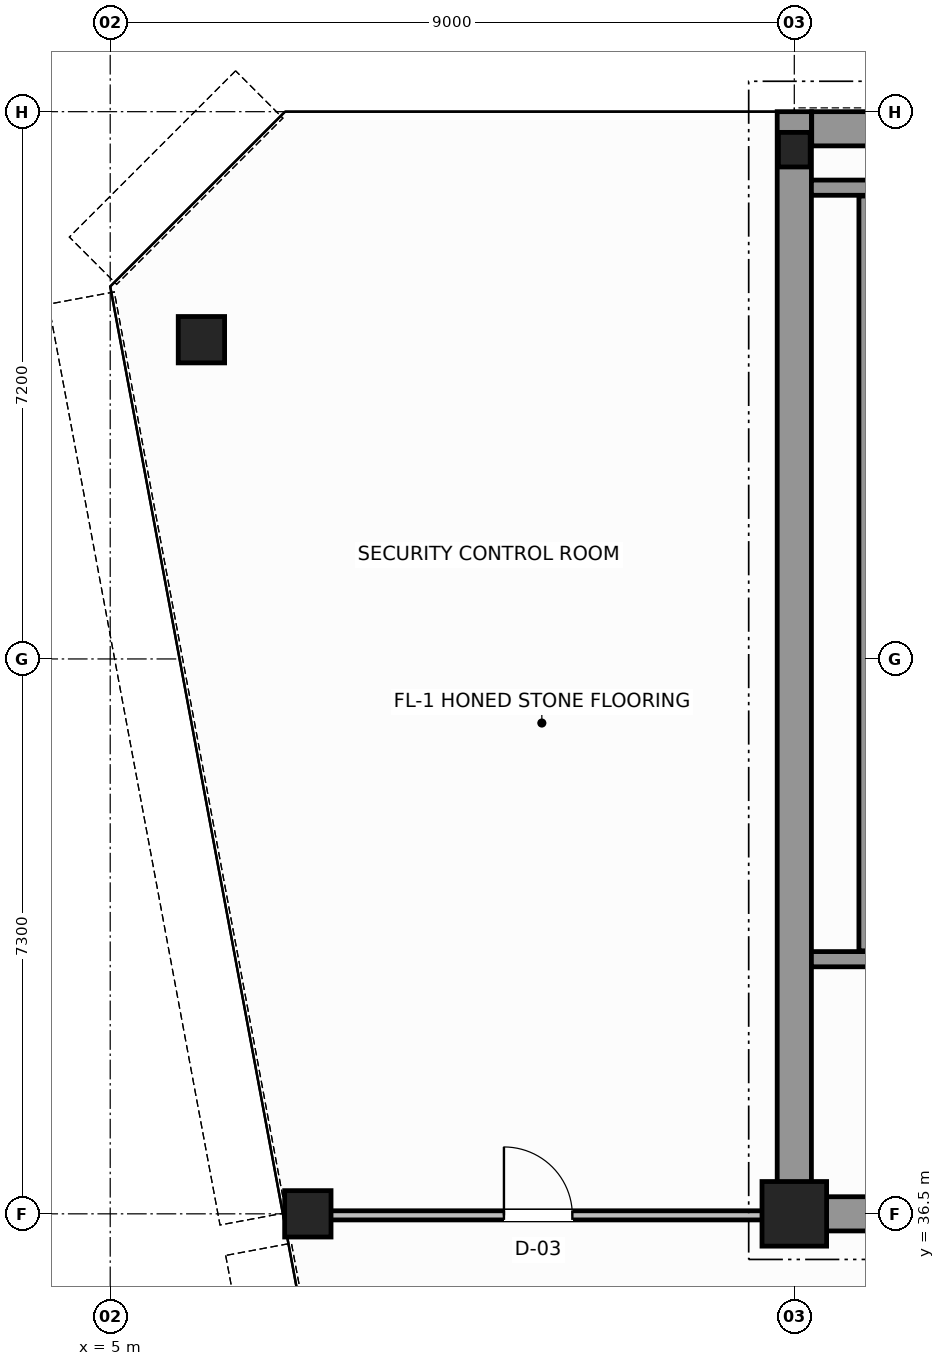
"""IFC4 building model, lengths in metres.
Left out: names, types, materials, properties, quantities, classifications, styles, units other than length and angle.
Written with IfcOpenShell. Run it as: python <this file> out.ifc"""

import sys

from ifc_helpers import new_model, si_unit, direction, frame, frame_2d, origin, origin_2d, place, context, subcontext, project, spatial, rectangle, hollow_circle, i_section, extrude, source, transform, mapped, element, fill, save


model = new_model("IFC4")
c1 = context("Model", 3, precision=1e-05, world=origin(), true_north=direction((0.0, 1.0)))
c2 = subcontext(c1, "Body", "Model", "MODEL_VIEW")
j1 = project(units=[si_unit("LENGTHUNIT", "METRE"), si_unit("PLANEANGLEUNIT", "RADIAN")], contexts=[c1])
p1 = place(None, origin())
s1 = spatial("IfcSite", under=j1, at=p1, CompositionType="ELEMENT")
p2 = place(p1, origin())
s2 = spatial("IfcBuilding", under=s1, at=p2, CompositionType="ELEMENT")
p3 = place(p2, frame((0.0, 0.0, 265.0)))
s3 = spatial("IfcBuildingStorey", under=s2, at=p3, CompositionType="ELEMENT", Elevation=265.0)
m1 = source(origin(), c2, "Body", "SweptSolid", [
    extrude(rectangle(XDim=0.85, YDim=0.85, at=origin_2d()), origin(), (0.0, 0.0, 1.0), 3.8),
])
p4 = place(p3, frame((14.0, 36.5, 0.0), z_axis=(0.0, 0.0, 1.0), x_axis=(1.0, 0.0, 0.0)))
e1 = element("IfcColumn", 1, at=p4, inside=s3, PredefinedType="COLUMN", context=c2, shape_type="MappedRepresentation", body=[
    mapped(m1, transform((0.0, 0.0, 0.0), scale=1.0)),
])
m2 = source(origin(), c2, "Body", "SweptSolid", [
    extrude(i_section(OverallWidth=0.418, OverallDepth=0.455, WebThickness=0.042, FlangeThickness=0.058, FilletRadius=0.015, at=origin_2d()), origin(), (0.0, 0.0, 1.0), 3.8),
])
p5 = place(p3, frame((14.0, 50.5, 0.0), z_axis=(0.0, 0.0, 1.0), x_axis=(1.0, 0.0, 0.0)))
e2 = element("IfcColumn", 2, at=p5, inside=s3, PredefinedType="COLUMN", context=c2, shape_type="MappedRepresentation", body=[
    mapped(m2, transform((0.0, 0.0, 0.0), scale=1.0)),
])
m3 = source(origin(), c2, "Body", "SweptSolid", [
    extrude(hollow_circle(Radius=0.305, WallThickness=0.03, at=origin_2d()), origin(), (0.0, 0.0, 1.0), 3.8),
])
for number, where, z_axis, x_axis in (
    (3, (6.2, 48.0, 0.0), (0.0, 0.0, 1.0), (1.0, 0.0, 0.0)),
    (4, (7.6, 36.5, 0.0), (0.0, 0.0, 1.0), (1.0, 0.0, 0.0)),
):
    element("IfcColumn", number, at=place(p3, frame(where, z_axis=z_axis, x_axis=x_axis)), inside=s3, PredefinedType="COLUMN", context=c2, shape_type="MappedRepresentation", body=[
        mapped(m3, transform((0.0, 0.0, 0.0), scale=1.0)),
    ])
p6 = place(p3, frame((14.229, 50.775, 0.0), z_axis=(0.0, 0.0, 1.0), x_axis=(1.0, 0.0, 0.0)))
e5 = element("IfcWall", 5, at=p6, inside=s3, PredefinedType="SHEAR", context=c2, shape_type="SweptSolid", body=[
    extrude(rectangle(XDim=19.769, YDim=0.45, at=frame_2d((9.885, 0.0))), origin(), (0.0, 0.0, 1.0), 3.8),
])
p7 = place(p3, frame((14.0, 36.5, 0.0), z_axis=(0.0, 0.0, 1.0), x_axis=(0.0, 1.0, 0.0)))
e6 = element("IfcWall", 6, at=p7, inside=s3, PredefinedType="SHEAR", context=c2, shape_type="SweptSolid", body=[
    extrude(rectangle(XDim=14.5, YDim=0.45, at=frame_2d((7.25, 0.0))), origin(), (0.0, 0.0, 1.0), 3.8),
])
p8 = place(p3, frame((14.245, 36.5, 0.0), z_axis=(0.0, 0.0, 1.0), x_axis=(1.0, 0.0, 0.0)))
e7 = element("IfcWall", 7, at=p8, inside=s3, PredefinedType="SHEAR", context=c2, shape_type="SweptSolid", body=[
    extrude(rectangle(XDim=3.955, YDim=0.45, at=frame_2d((1.978, 0.0))), origin(), (0.0, 0.0, 1.0), 2.58),
])
p9 = place(p3, frame((14.225, 39.85, 0.0), z_axis=(0.0, 0.0, 1.0), x_axis=(1.0, 0.0, 0.0)))
e8 = element("IfcWall", 8, at=p9, inside=s3, PredefinedType="SOLIDWALL", context=c2, shape_type="SweptSolid", body=[
    extrude(rectangle(XDim=4.375, YDim=0.2, at=frame_2d((2.188, 0.0))), origin(), (0.0, 0.0, 1.0), 3.8),
])
p10 = place(p9, frame((1.95, 0.0, 0.0)))
e9 = element("IfcOpeningElement", 9, at=p10, cuts=e8, PredefinedType="OPENING", context=c2, shape_type="SweptSolid", body=[
    extrude(rectangle(XDim=1.1, YDim=2.15, at=frame_2d((0.55, 1.075))), frame((0.0, 0.11, 0.0), z_axis=(0.0, -1.0, 0.0), x_axis=(1.0, 0.0, 0.0)), (0.0, 0.0, 1.0), 0.22),
])
p11 = place(p3, frame((14.225, 50.0, 0.0), z_axis=(0.0, 0.0, 1.0), x_axis=(1.0, 0.0, 0.0)))
e10 = element("IfcWall", 10, at=p11, inside=s3, PredefinedType="SOLIDWALL", context=c2, shape_type="SweptSolid", body=[
    extrude(rectangle(XDim=4.375, YDim=0.2, at=frame_2d((2.188, 0.0))), origin(), (0.0, 0.0, 1.0), 3.8),
])
p12 = place(p3, frame((14.95, 39.96, 0.0), z_axis=(0.0, 0.0, 1.0), x_axis=(0.0, 1.0, 0.0)))
e11 = element("IfcWall", 11, at=p12, inside=s3, PredefinedType="SOLIDWALL", context=c2, shape_type="SweptSolid", body=[
    extrude(rectangle(XDim=9.93, YDim=0.2, at=frame_2d((4.965, 0.0))), origin(), (0.0, 0.0, 1.0), 3.8),
])
p13 = place(p3, frame((7.321, 36.48, 0.0), z_axis=(0.0, 0.0, 1.0), x_axis=(1.0, 0.0, 0.0)))
e12 = element("IfcWall", 12, at=p13, inside=s3, PredefinedType="PARTITIONING", context=c2, shape_type="SweptSolid", body=[
    extrude(rectangle(XDim=6.619, YDim=0.12, at=frame_2d((3.31, 0.0))), origin(), (0.0, 0.0, 1.0), 2.37),
])
p14 = place(p13, frame((2.859, 0.0, 0.0)))
e13 = element("IfcOpeningElement", 13, at=p14, cuts=e12, PredefinedType="OPENING", context=c2, shape_type="SweptSolid", body=[
    extrude(rectangle(XDim=0.9, YDim=2.15, at=frame_2d((0.45, 1.075))), frame((0.0, 0.07, 0.0), z_axis=(0.0, -1.0, 0.0), x_axis=(1.0, 0.0, 0.0)), (0.0, 0.0, 1.0), 0.14),
])
m4 = source(origin(), c2, "Body", "SweptSolid", [
    extrude(rectangle(XDim=0.9, YDim=2.15, at=frame_2d((0.45, 1.075))), frame((0.0, 0.025, 0.0), z_axis=(0.0, -1.0, 0.0), x_axis=(1.0, 0.0, 0.0)), (0.0, 0.0, 1.0), 0.05),
])
p15 = place(p14, origin())
e14 = element("IfcDoor", 14, at=p15, inside=s3, OperationType="SINGLE_SWING_LEFT", PredefinedType="DOOR", context=c2, shape_type="MappedRepresentation", body=[
    mapped(m4, transform((0.0, 0.0, 0.0), scale=1.0)),
])
fill(e13, e14)
save(model, sys.argv[1])
